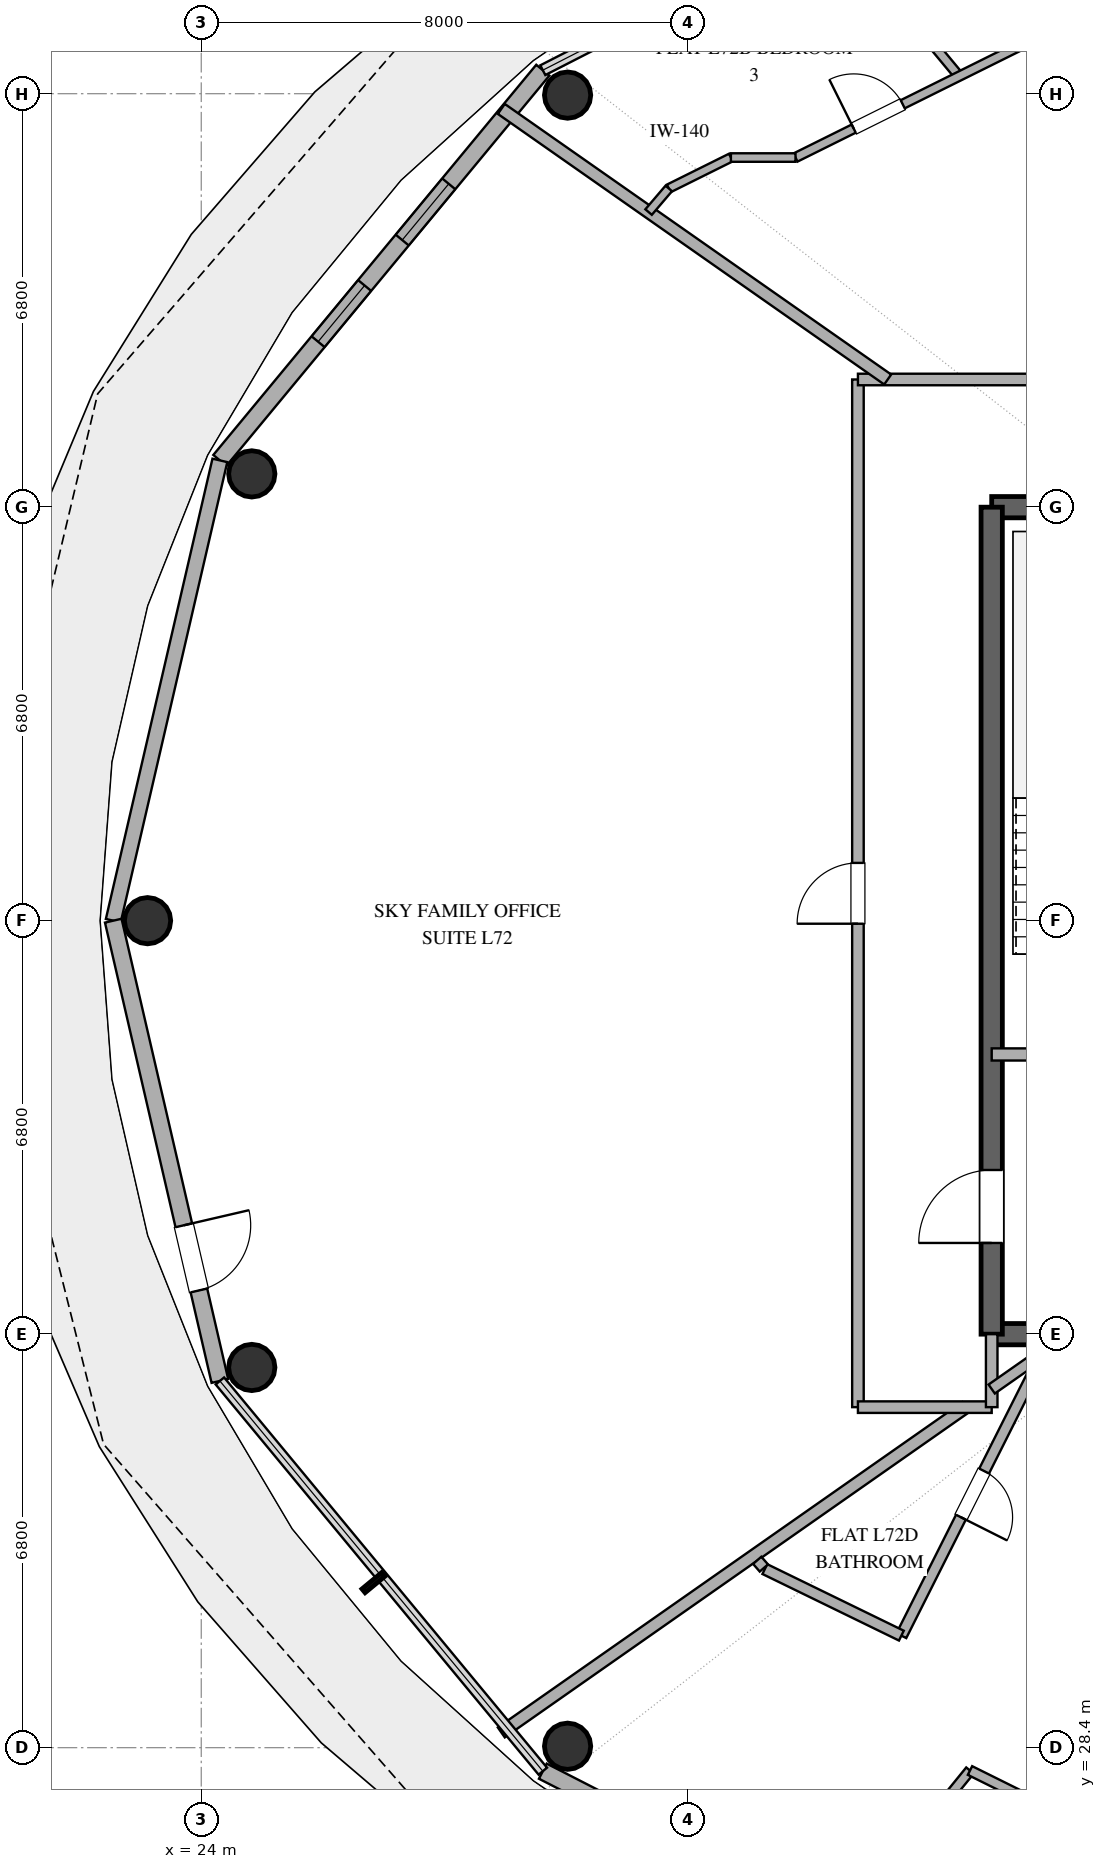
"""IFC4 building model, lengths in metres.
Left out: names, types, materials, properties, quantities, classifications, styles, units other than length and angle.
Written with IfcOpenShell. Run it as: python <this file> out.ifc"""

import sys

from ifc_helpers import new_model, si_unit, direction, frame, frame_2d, origin, origin_2d, place, context, subcontext, project, spatial, rectangle, hollow_circle, extrude, element, fill, save


model = new_model("IFC4")
c1 = context("Model", 3, precision=1e-05, world=origin(), true_north=direction((0.0, 1.0)))
c2 = subcontext(c1, "Body", "Model", "MODEL_VIEW")
j1 = project(units=[si_unit("LENGTHUNIT", "METRE"), si_unit("PLANEANGLEUNIT", "RADIAN")], contexts=[c1])
p1 = place(None, origin())
s1 = spatial("IfcSite", under=j1, at=p1, CompositionType="ELEMENT")
p2 = place(p1, origin())
s2 = spatial("IfcBuilding", under=s1, at=p2, CompositionType="ELEMENT")
p3 = place(p2, frame((0.0, 0.0, 280.2)))
s3 = spatial("IfcBuildingStorey", under=s2, at=p3, CompositionType="ELEMENT", Elevation=280.2)
for number, where, z_axis, x_axis in (
    (1, (37.0, 35.2, 0.0), (0.0, 0.0, 1.0), (1.0, 0.0, 0.0)),
    (2, (37.0, 48.8, 0.0), (0.0, 0.0, 1.0), (1.0, 0.0, 0.0)),
):
    element("IfcWall", number, at=place(p3, frame(where, z_axis=z_axis, x_axis=x_axis)), inside=s3, PredefinedType="SHEAR", context=c2, shape_type="SweptSolid", body=[
        extrude(rectangle(XDim=4.0, YDim=0.35, at=frame_2d((2.0, 0.0))), origin(), (0.0, 0.0, 1.0), 3.37),
    ])
p4 = place(p3, frame((37.0, 35.2, 0.0), z_axis=(0.0, 0.0, 1.0), x_axis=(0.0, 1.0, 0.0)))
e3 = element("IfcWall", 3, at=p4, inside=s3, PredefinedType="SHEAR", context=c2, shape_type="SweptSolid", body=[
    extrude(rectangle(XDim=13.6, YDim=0.35, at=frame_2d((6.8, 0.0))), origin(), (0.0, 0.0, 1.0), 3.37),
])
p5 = place(p4, frame((1.5, 0.0, 0.0)))
e4 = element("IfcOpeningElement", 4, at=p5, cuts=e3, PredefinedType="OPENING", context=c2, shape_type="SweptSolid", body=[
    extrude(rectangle(XDim=1.2, YDim=2.15, at=frame_2d((0.6, 1.075))), frame((0.0, 0.185, 0.0), z_axis=(0.0, -1.0, 0.0), x_axis=(1.0, 0.0, 0.0)), (0.0, 0.0, 1.0), 0.37),
])
for number, where, z_axis, x_axis in (
    (5, (30.025, 55.576, 0.0), (0.0, 0.0, 1.0), (1.0, 0.0, 0.0)),
    (6, (24.831, 49.347, 0.0), (0.0, 0.0, 1.0), (1.0, 0.0, 0.0)),
    (7, (23.117, 42.0, 0.0), (0.0, 0.0, 1.0), (1.0, 0.0, 0.0)),
    (8, (24.831, 34.653, 0.0), (0.0, 0.0, 1.0), (1.0, 0.0, 0.0)),
    (9, (30.025, 28.424, 0.0), (0.0, 0.0, 1.0), (1.0, 0.0, 0.0)),
):
    element("IfcColumn", number, at=place(p3, frame(where, z_axis=z_axis, x_axis=x_axis)), inside=s3, PredefinedType="COLUMN", context=c2, shape_type="SweptSolid", body=[
        extrude(hollow_circle(Radius=0.381, WallThickness=0.025, at=origin_2d()), origin(), (0.0, 0.0, 1.0), 3.37),
    ])
p6 = place(p3, frame((29.617, 55.987, 0.0), z_axis=(0.0, 0.0, 1.0), x_axis=(-0.63761509934, -0.770355103243, 0.0)))
e10 = element("IfcWall", 10, at=p6, inside=s3, PredefinedType="SOLIDWALL", context=c2, shape_type="SweptSolid", body=[
    extrude(rectangle(XDim=8.33, YDim=0.28, at=frame_2d((4.165, 0.0))), origin(), (0.0, 0.0, 1.0), 3.37),
])
p7 = place(p6, frame((2.426, 0.0, 0.85)))
e11 = element("IfcOpeningElement", 11, at=p7, cuts=e10, PredefinedType="OPENING", context=c2, shape_type="SweptSolid", body=[
    extrude(rectangle(XDim=1.2, YDim=1.6, at=frame_2d((0.6, 0.8))), frame((0.0, 0.15, 0.0), z_axis=(0.0, -1.0, 0.0), x_axis=(1.0, 0.0, 0.0)), (0.0, 0.0, 1.0), 0.3),
])
p8 = place(p6, frame((4.596, 0.0, 0.85)))
e12 = element("IfcOpeningElement", 12, at=p8, cuts=e10, PredefinedType="OPENING", context=c2, shape_type="SweptSolid", body=[
    extrude(rectangle(XDim=1.2, YDim=1.6, at=frame_2d((0.6, 0.8))), frame((0.0, 0.15, 0.0), z_axis=(0.0, -1.0, 0.0), x_axis=(1.0, 0.0, 0.0)), (0.0, 0.0, 1.0), 0.3),
])
p9 = place(p3, frame((24.306, 49.57, 0.0), z_axis=(0.0, 0.0, 1.0), x_axis=(-0.225635078214, -0.974211892495, 0.0)))
e13 = element("IfcWall", 13, at=p9, inside=s3, PredefinedType="SOLIDWALL", context=c2, shape_type="SweptSolid", body=[
    extrude(rectangle(XDim=7.77, YDim=0.25, at=frame_2d((3.885, 0.0))), origin(), (0.0, 0.0, 1.0), 3.37),
])
p10 = place(p3, frame((22.553, 42.0, 0.0), z_axis=(0.0, 0.0, 1.0), x_axis=(0.225635078214, -0.974211892495, 0.0)))
e14 = element("IfcWall", 14, at=p10, inside=s3, PredefinedType="SOLIDWALL", context=c2, shape_type="SweptSolid", body=[
    extrude(rectangle(XDim=7.77, YDim=0.28, at=frame_2d((3.885, 0.0))), origin(), (0.0, 0.0, 1.0), 3.37),
])
p11 = place(p10, frame((5.142, 0.0, 0.0)))
e15 = element("IfcOpeningElement", 15, at=p11, cuts=e14, PredefinedType="OPENING", context=c2, shape_type="SweptSolid", body=[
    extrude(rectangle(XDim=1.1, YDim=2.25, at=frame_2d((0.55, 1.125))), frame((0.0, 0.15, 0.0), z_axis=(0.0, -1.0, 0.0), x_axis=(1.0, 0.0, 0.0)), (0.0, 0.0, 1.0), 0.3),
])
p12 = place(p3, frame((29.617, 28.013, 0.0), z_axis=(0.0, 0.0, 1.0), x_axis=(0.890007394051, -0.455946091699, 0.0)))
e16 = element("IfcWall", 16, at=p12, inside=s3, PredefinedType="SOLIDWALL", context=c2, shape_type="SweptSolid", body=[
    extrude(rectangle(XDim=9.404, YDim=0.28, at=frame_2d((4.702, 0.0))), origin(), (0.0, 0.0, 1.0), 3.37),
])
p13 = place(p12, frame((2.684, 0.0, 0.85)))
e17 = element("IfcOpeningElement", 17, at=p13, cuts=e16, PredefinedType="OPENING", context=c2, shape_type="SweptSolid", body=[
    extrude(rectangle(XDim=1.5, YDim=2.0, at=frame_2d((0.75, 1.0))), frame((0.0, 0.15, 0.0), z_axis=(0.0, -1.0, 0.0), x_axis=(1.0, 0.0, 0.0)), (0.0, 0.0, 1.0), 0.3),
])
p14 = place(p12, frame((6.125, 0.0, 0.85)))
e18 = element("IfcOpeningElement", 18, at=p14, cuts=e16, PredefinedType="OPENING", context=c2, shape_type="SweptSolid", body=[
    extrude(rectangle(XDim=1.5, YDim=1.8, at=frame_2d((0.75, 0.9))), frame((0.0, 0.15, 0.0), z_axis=(0.0, -1.0, 0.0), x_axis=(1.0, 0.0, 0.0)), (0.0, 0.0, 1.0), 0.3),
])
p15 = place(p3, frame((37.0, 39.8, 0.0), z_axis=(0.0, 0.0, 1.0), x_axis=(1.0, 0.0, 0.0)))
e19 = element("IfcWall", 19, at=p15, inside=s3, PredefinedType="SOLIDWALL", context=c2, shape_type="SweptSolid", body=[
    extrude(rectangle(XDim=4.0, YDim=0.2, at=frame_2d((2.0, 0.0))), origin(), (0.0, 0.0, 1.0), 2.73),
])
p16 = place(p15, frame((1.45, 0.0, 0.0)))
e20 = element("IfcOpeningElement", 20, at=p16, cuts=e19, PredefinedType="OPENING", context=c2, shape_type="SweptSolid", body=[
    extrude(rectangle(XDim=1.1, YDim=2.15, at=frame_2d((0.55, 1.075))), frame((0.0, 0.11, 0.0), z_axis=(0.0, -1.0, 0.0), x_axis=(1.0, 0.0, 0.0)), (0.0, 0.0, 1.0), 0.22),
])
p17 = place(p3, frame((34.8, 34.0, 0.0), z_axis=(0.0, 0.0, 1.0), x_axis=(0.0, 1.0, 0.0)))
e21 = element("IfcWall", 21, at=p17, inside=s3, PredefinedType="PARTITIONING", context=c2, shape_type="SweptSolid", body=[
    extrude(rectangle(XDim=16.9, YDim=0.19, at=frame_2d((8.45, 0.0))), origin(), (0.0, 0.0, 1.0), 2.73),
])
p18 = place(p17, frame((7.95, 0.0, 0.0)))
e22 = element("IfcOpeningElement", 22, at=p18, cuts=e21, PredefinedType="OPENING", context=c2, shape_type="SweptSolid", body=[
    extrude(rectangle(XDim=1.0, YDim=2.2, at=frame_2d((0.5, 1.1))), frame((0.0, 0.105, 0.0), z_axis=(0.0, -1.0, 0.0), x_axis=(1.0, 0.0, 0.0)), (0.0, 0.0, 1.0), 0.21),
])
p19 = place(p3, frame((34.8, 50.9, 0.0), z_axis=(0.0, 0.0, 1.0), x_axis=(1.0, 0.0, 0.0)))
e23 = element("IfcWall", 23, at=p19, inside=s3, PredefinedType="PARTITIONING", context=c2, shape_type="SweptSolid", body=[
    extrude(rectangle(XDim=15.618, YDim=0.19, at=frame_2d((7.809, 0.0))), origin(), (0.0, 0.0, 1.0), 2.73),
])
p20 = place(p19, frame((6.848, 0.0, 0.0)))
e24 = element("IfcOpeningElement", 24, at=p20, cuts=e23, PredefinedType="OPENING", context=c2, shape_type="SweptSolid", body=[
    extrude(rectangle(XDim=1.0, YDim=2.2, at=frame_2d((0.5, 1.1))), frame((0.0, 0.105, 0.0), z_axis=(0.0, -1.0, 0.0), x_axis=(1.0, 0.0, 0.0)), (0.0, 0.0, 1.0), 0.21),
])
p21 = place(p3, frame((37.855, 34.896, 0.0), z_axis=(0.0, 0.0, 1.0), x_axis=(-0.449274589412, -0.893393722447, 0.0)))
e25 = element("IfcWall", 25, at=p21, inside=s3, PredefinedType="PLUMBINGWALL", context=c2, shape_type="SweptSolid", body=[
    extrude(rectangle(XDim=5.209, YDim=0.18, at=frame_2d((2.604, 0.0))), origin(), (0.0, 0.0, 1.0), 2.73),
])
p22 = place(p21, frame((2.18, 0.0, 0.0)))
e26 = element("IfcOpeningElement", 26, at=p22, cuts=e25, PredefinedType="OPENING", context=c2, shape_type="SweptSolid", body=[
    extrude(rectangle(XDim=0.85, YDim=2.1, at=frame_2d((0.425, 1.05))), frame((0.0, 0.1, 0.0), z_axis=(0.0, -1.0, 0.0), x_axis=(1.0, 0.0, 0.0)), (0.0, 0.0, 1.0), 0.2),
])
p23 = place(p3, frame((36.575, 34.0, 0.0), z_axis=(0.0, 0.0, 1.0), x_axis=(-0.819138444565, -0.57359585828, 0.0)))
e27 = element("IfcWall", 27, at=p23, inside=s3, PredefinedType="PARTITIONING", context=c2, shape_type="SweptSolid", body=[
    extrude(rectangle(XDim=9.326, YDim=0.2, at=frame_2d((4.663, 0.0))), origin(), (0.0, 0.0, 1.0), 2.73),
])
p24 = place(p3, frame((35.29, 50.9, 0.0), z_axis=(0.0, 0.0, 1.0), x_axis=(-0.819162424527, 0.573561611549, 0.0)))
e28 = element("IfcWall", 28, at=p24, inside=s3, PredefinedType="PARTITIONING", context=c2, shape_type="SweptSolid", body=[
    extrude(rectangle(XDim=7.758, YDim=0.2, at=frame_2d((3.879, 0.0))), origin(), (0.0, 0.0, 1.0), 2.73),
])
p25 = place(p3, frame((36.465, 55.887, 0.0), z_axis=(0.0, 0.0, 1.0), x_axis=(-0.638979285107, 0.769223942168, 0.0)))
e29 = element("IfcWall", 29, at=p25, inside=s3, PredefinedType="PARTITIONING", context=c2, shape_type="SweptSolid", body=[
    extrude(rectangle(XDim=3.41, YDim=0.15, at=frame_2d((1.705, 0.0))), origin(), (0.0, 0.0, 1.0), 2.73),
])
p26 = place(p3, frame((36.643, 28.024, 0.0), z_axis=(0.0, 0.0, 1.0), x_axis=(-0.630641219738, -0.776074514442, 0.0)))
e30 = element("IfcWall", 30, at=p26, inside=s3, PredefinedType="PLUMBINGWALL", context=c2, shape_type="SweptSolid", body=[
    extrude(rectangle(XDim=3.405, YDim=0.16, at=frame_2d((1.702, 0.0))), origin(), (0.0, 0.0, 1.0), 2.73),
])
p27 = place(p26, frame((1.192, 0.0, 0.0)))
e31 = element("IfcOpeningElement", 31, at=p27, cuts=e30, PredefinedType="OPENING", context=c2, shape_type="SweptSolid", body=[
    extrude(rectangle(XDim=0.9, YDim=2.1, at=frame_2d((0.45, 1.05))), frame((0.0, 0.09, 0.0), z_axis=(0.0, -1.0, 0.0), x_axis=(1.0, 0.0, 0.0)), (0.0, 0.0, 1.0), 0.18),
])
p28 = place(p3, frame((33.773, 54.55, 0.0), z_axis=(0.0, 0.0, 1.0), x_axis=(0.895593510097, 0.44487331306, 0.0)))
e32 = element("IfcWall", 32, at=p28, inside=s3, PredefinedType="PARTITIONING", context=c2, shape_type="SweptSolid", body=[
    extrude(rectangle(XDim=6.222, YDim=0.15, at=frame_2d((3.111, 0.0))), origin(), (0.0, 0.0, 1.0), 2.73),
])
p29 = place(p28, frame((4.147, 0.0, 0.0)))
e33 = element("IfcOpeningElement", 33, at=p29, cuts=e32, PredefinedType="OPENING", context=c2, shape_type="SweptSolid", body=[
    extrude(rectangle(XDim=0.9, YDim=2.1, at=frame_2d((0.45, 1.05))), frame((0.0, 0.085, 0.0), z_axis=(0.0, -1.0, 0.0), x_axis=(1.0, 0.0, 0.0)), (0.0, 0.0, 1.0), 0.17),
])
p30 = place(p28, frame((1.069, 0.0, 0.0)))
e34 = element("IfcOpeningElement", 34, at=p30, cuts=e32, PredefinedType="OPENING", context=c2, shape_type="SweptSolid", body=[
    extrude(rectangle(XDim=0.9, YDim=2.1, at=frame_2d((0.45, 1.05))), frame((0.0, 0.085, 0.0), z_axis=(0.0, -1.0, 0.0), x_axis=(1.0, 0.0, 0.0)), (0.0, 0.0, 1.0), 0.17),
])
p31 = place(p3, frame((39.345, 26.682, 0.0), z_axis=(0.0, 0.0, 1.0), x_axis=(-0.895589359885, 0.44488166793, 0.0)))
e35 = element("IfcWall", 35, at=p31, inside=s3, PredefinedType="PLUMBINGWALL", context=c2, shape_type="SweptSolid", body=[
    extrude(rectangle(XDim=3.017, YDim=0.16, at=frame_2d((1.509, 0.0))), origin(), (0.0, 0.0, 1.0), 2.73),
])
p32 = place(p3, frame((35.514, 30.242, 0.0), z_axis=(0.0, 0.0, 1.0), x_axis=(-0.898915857852, 0.438121307975, 0.0)))
e36 = element("IfcWall", 36, at=p32, inside=s3, PredefinedType="PLUMBINGWALL", context=c2, shape_type="SweptSolid", body=[
    extrude(rectangle(XDim=2.498, YDim=0.18, at=frame_2d((1.249, 0.0))), origin(), (0.0, 0.0, 1.0), 2.73),
])
p33 = place(p3, frame((37.0, 34.0, 0.0), z_axis=(0.0, 0.0, 1.0), x_axis=(-1.0, 0.0, 0.0)))
e37 = element("IfcWall", 37, at=p33, inside=s3, PredefinedType="PARTITIONING", context=c2, shape_type="SweptSolid", body=[
    extrude(rectangle(XDim=2.2, YDim=0.19, at=frame_2d((1.1, 0.0))), origin(), (0.0, 0.0, 1.0), 2.73),
])
p34 = place(p3, frame((37.0, 35.2, 0.0), z_axis=(0.0, 0.0, 1.0), x_axis=(0.0, -1.0, 0.0)))
e38 = element("IfcWall", 38, at=p34, inside=s3, PredefinedType="PARTITIONING", context=c2, shape_type="SweptSolid", body=[
    extrude(rectangle(XDim=1.2, YDim=0.19, at=frame_2d((0.6, 0.0))), origin(), (0.0, 0.0, 1.0), 2.73),
])
p35 = place(p3, frame((31.689, 54.042, 0.0), z_axis=(0.0, 0.0, 1.0), x_axis=(0.895409226325, 0.445244109912, 0.0)))
e39 = element("IfcWall", 39, at=p35, inside=s3, PredefinedType="PARTITIONING", context=c2, shape_type="SweptSolid", body=[
    extrude(rectangle(XDim=1.141, YDim=0.14, at=frame_2d((0.571, 0.0))), origin(), (0.0, 0.0, 1.0), 2.73),
])
p36 = place(p3, frame((32.711, 54.55, 0.0), z_axis=(0.0, 0.0, 1.0), x_axis=(1.0, 0.0, 0.0)))
e40 = element("IfcWall", 40, at=p36, inside=s3, PredefinedType="PARTITIONING", context=c2, shape_type="SweptSolid", body=[
    extrude(rectangle(XDim=1.062, YDim=0.14, at=frame_2d((0.531, 0.0))), origin(), (0.0, 0.0, 1.0), 2.73),
])
p37 = place(p3, frame((37.0, 34.298, 0.0), z_axis=(0.0, 0.0, 1.0), x_axis=(0.81908900763, 0.573666451502, 0.0)))
e41 = element("IfcWall", 41, at=p37, inside=s3, PredefinedType="PLUMBINGWALL", context=c2, shape_type="SweptSolid", body=[
    extrude(rectangle(XDim=1.043, YDim=0.18, at=frame_2d((0.522, 0.0))), origin(), (0.0, 0.0, 1.0), 2.73),
])
p38 = place(p3, frame((31.357, 53.653, 0.0), z_axis=(0.0, 0.0, 1.0), x_axis=(0.648979151054, 0.76080619181, 0.0)))
e42 = element("IfcWall", 42, at=p38, inside=s3, PredefinedType="PARTITIONING", context=c2, shape_type="SweptSolid", body=[
    extrude(rectangle(XDim=0.511, YDim=0.14, at=frame_2d((0.255, 0.0))), origin(), (0.0, 0.0, 1.0), 2.73),
])
p39 = place(p3, frame((33.253, 31.355, 0.0), z_axis=(0.0, 0.0, 1.0), x_axis=(-0.656323784366, 0.754479350331, 0.0)))
e43 = element("IfcWall", 43, at=p39, inside=s3, PredefinedType="PLUMBINGWALL", context=c2, shape_type="SweptSolid", body=[
    extrude(rectangle(XDim=0.167, YDim=0.18, at=frame_2d((0.083, 0.0))), origin(), (0.0, 0.0, 1.0), 2.73),
])
p40 = place(p7, origin())
e44 = element("IfcWindow", 44, at=p40, inside=s3, PartitioningType="SINGLE_PANEL", PredefinedType="WINDOW", context=c2, shape_type="SweptSolid", body=[
    extrude(rectangle(XDim=1.2, YDim=1.6, at=frame_2d((0.6, 0.8))), frame((0.0, 0.03, 0.0), z_axis=(0.0, -1.0, 0.0), x_axis=(1.0, 0.0, 0.0)), (0.0, 0.0, 1.0), 0.06),
])
fill(e11, e44)
p41 = place(p8, origin())
e45 = element("IfcWindow", 45, at=p41, inside=s3, PartitioningType="SINGLE_PANEL", PredefinedType="WINDOW", context=c2, shape_type="SweptSolid", body=[
    extrude(rectangle(XDim=1.2, YDim=1.6, at=frame_2d((0.6, 0.8))), frame((0.0, 0.03, 0.0), z_axis=(0.0, -1.0, 0.0), x_axis=(1.0, 0.0, 0.0)), (0.0, 0.0, 1.0), 0.06),
])
fill(e12, e45)
p42 = place(p11, origin())
e46 = element("IfcDoor", 46, at=p42, inside=s3, OperationType="SINGLE_SWING_LEFT", PredefinedType="DOOR", context=c2, shape_type="SweptSolid", body=[
    extrude(rectangle(XDim=1.1, YDim=2.25, at=frame_2d((0.55, 1.125))), frame((0.0, 0.025, 0.0), z_axis=(0.0, -1.0, 0.0), x_axis=(1.0, 0.0, 0.0)), (0.0, 0.0, 1.0), 0.05),
])
fill(e15, e46)
p43 = place(p5, origin())
e47 = element("IfcDoor", 47, at=p43, inside=s3, OperationType="SINGLE_SWING_LEFT", PredefinedType="DOOR", context=c2, shape_type="SweptSolid", body=[
    extrude(rectangle(XDim=1.2, YDim=2.15, at=frame_2d((0.6, 1.075))), frame((0.0, 0.025, 0.0), z_axis=(0.0, -1.0, 0.0), x_axis=(1.0, 0.0, 0.0)), (0.0, 0.0, 1.0), 0.05),
])
fill(e4, e47)
p44 = place(p18, origin())
e48 = element("IfcDoor", 48, at=p44, inside=s3, OperationType="SINGLE_SWING_LEFT", PredefinedType="DOOR", context=c2, shape_type="SweptSolid", body=[
    extrude(rectangle(XDim=1.0, YDim=2.2, at=frame_2d((0.5, 1.1))), frame((0.0, 0.025, 0.0), z_axis=(0.0, -1.0, 0.0), x_axis=(1.0, 0.0, 0.0)), (0.0, 0.0, 1.0), 0.05),
])
fill(e22, e48)
p45 = place(p22, origin())
e49 = element("IfcDoor", 49, at=p45, inside=s3, OperationType="SINGLE_SWING_RIGHT", PredefinedType="DOOR", context=c2, shape_type="SweptSolid", body=[
    extrude(rectangle(XDim=0.85, YDim=2.1, at=frame_2d((0.425, 1.05))), frame((0.0, 0.025, 0.0), z_axis=(0.0, -1.0, 0.0), x_axis=(1.0, 0.0, 0.0)), (0.0, 0.0, 1.0), 0.05),
])
fill(e26, e49)
p46 = place(p30, origin())
e50 = element("IfcDoor", 50, at=p46, inside=s3, OperationType="SINGLE_SWING_LEFT", PredefinedType="DOOR", context=c2, shape_type="SweptSolid", body=[
    extrude(rectangle(XDim=0.9, YDim=2.1, at=frame_2d((0.45, 1.05))), frame((0.0, 0.025, 0.0), z_axis=(0.0, -1.0, 0.0), x_axis=(1.0, 0.0, 0.0)), (0.0, 0.0, 1.0), 0.05),
])
fill(e34, e50)
save(model, sys.argv[1])
